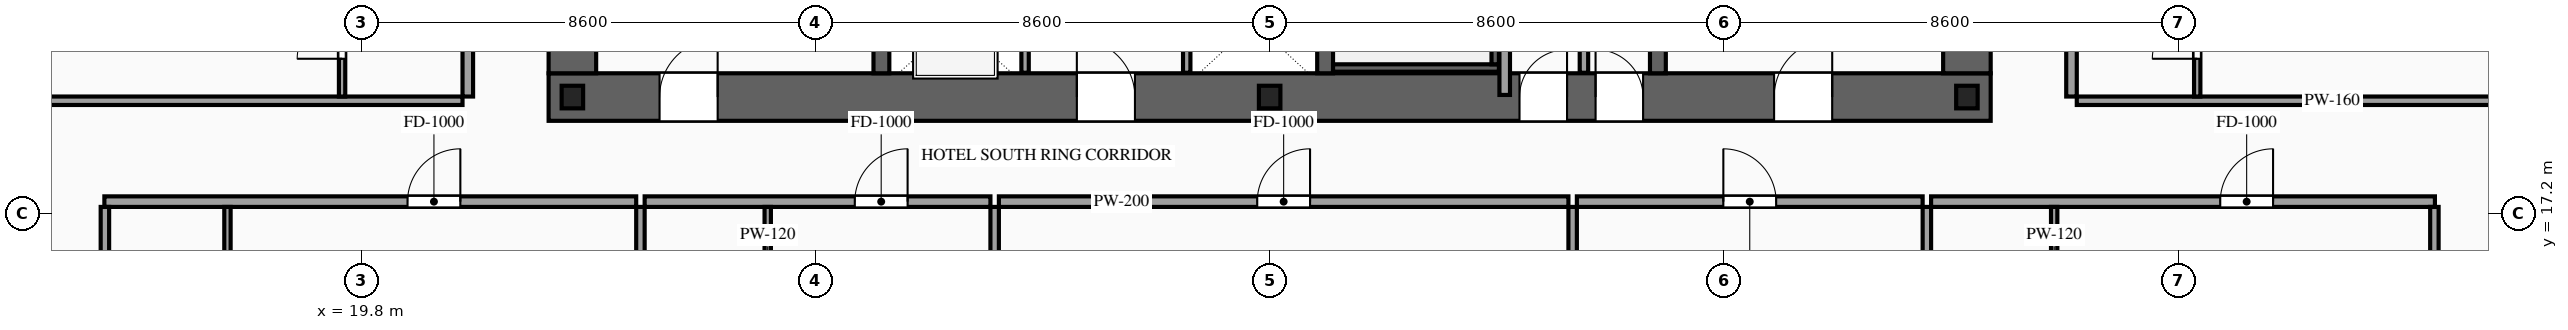
"""IFC4 building model, lengths in metres.
Left out: names, types, materials, properties, quantities, classifications, styles, units other than length and angle.
Written with IfcOpenShell. Run it as: python <this file> out.ifc"""

import sys

from ifc_helpers import new_model, si_unit, direction, frame, frame_2d, origin, origin_2d, place, context, subcontext, project, spatial, rectangle, i_section, extrude, source, transform, mapped, element, fill, save


model = new_model("IFC4")
c1 = context("Model", 3, precision=1e-05, world=origin(), true_north=direction((0.0, 1.0)))
c2 = subcontext(c1, "Body", "Model", "MODEL_VIEW")
j1 = project(units=[si_unit("LENGTHUNIT", "METRE"), si_unit("PLANEANGLEUNIT", "RADIAN")], contexts=[c1])
p1 = place(None, origin())
s1 = spatial("IfcSite", under=j1, at=p1, CompositionType="ELEMENT")
p2 = place(p1, origin())
s2 = spatial("IfcBuilding", under=s1, at=p2, CompositionType="ELEMENT")
p3 = place(p2, frame((0.0, 0.0, 46.0)))
s3 = spatial("IfcBuildingStorey", under=s2, at=p3, CompositionType="ELEMENT", Elevation=46.0)
p4 = place(p3, frame((23.35, 19.4, 0.0), z_axis=(0.0, 0.0, 1.0), x_axis=(1.0, 0.0, 0.0)))
e1 = element("IfcWall", 1, at=p4, inside=s3, PredefinedType="SHEAR", context=c2, shape_type="SweptSolid", body=[
    extrude(rectangle(XDim=27.3, YDim=0.9, at=frame_2d((13.65, 0.0))), origin(), (0.0, 0.0, 1.0), 3.6),
])
p5 = place(p4, frame((2.1, 0.0, 0.0)))
e2 = element("IfcOpeningElement", 2, at=p5, cuts=e1, PredefinedType="OPENING", context=c2, shape_type="SweptSolid", body=[
    extrude(rectangle(XDim=1.1, YDim=2.2, at=frame_2d((0.55, 1.1))), frame((0.0, 0.465, 0.0), z_axis=(0.0, -1.0, 0.0), x_axis=(1.0, 0.0, 0.0)), (0.0, 0.0, 1.0), 0.93),
])
p6 = place(p4, frame((10.0, 0.0, 0.0)))
e3 = element("IfcOpeningElement", 3, at=p6, cuts=e1, PredefinedType="OPENING", context=c2, shape_type="SweptSolid", body=[
    extrude(rectangle(XDim=1.1, YDim=2.2, at=frame_2d((0.55, 1.1))), frame((0.0, 0.465, 0.0), z_axis=(0.0, -1.0, 0.0), x_axis=(1.0, 0.0, 0.0)), (0.0, 0.0, 1.0), 0.93),
])
p7 = place(p4, frame((23.2, 0.0, 0.0)))
e4 = element("IfcOpeningElement", 4, at=p7, cuts=e1, PredefinedType="OPENING", context=c2, shape_type="SweptSolid", body=[
    extrude(rectangle(XDim=1.1, YDim=2.2, at=frame_2d((0.55, 1.1))), frame((0.0, 0.465, 0.0), z_axis=(0.0, -1.0, 0.0), x_axis=(1.0, 0.0, 0.0)), (0.0, 0.0, 1.0), 0.93),
])
p8 = place(p4, frame((19.82, 0.0, 0.0)))
e5 = element("IfcOpeningElement", 5, at=p8, cuts=e1, PredefinedType="OPENING", context=c2, shape_type="SweptSolid", body=[
    extrude(rectangle(XDim=0.9, YDim=2.15, at=frame_2d((0.45, 1.075))), frame((0.0, 0.465, 0.0), z_axis=(0.0, -1.0, 0.0), x_axis=(1.0, 0.0, 0.0)), (0.0, 0.0, 1.0), 0.93),
])
p9 = place(p4, frame((18.38, 0.0, 0.0)))
e6 = element("IfcOpeningElement", 6, at=p9, cuts=e1, PredefinedType="OPENING", context=c2, shape_type="SweptSolid", body=[
    extrude(rectangle(XDim=0.9, YDim=2.15, at=frame_2d((0.45, 1.075))), frame((0.0, 0.465, 0.0), z_axis=(0.0, -1.0, 0.0), x_axis=(1.0, 0.0, 0.0)), (0.0, 0.0, 1.0), 0.93),
])
m1 = source(origin(), c2, "Body", "SweptSolid", [
    extrude(rectangle(XDim=11.9, YDim=0.9, at=frame_2d((5.95, 0.0))), origin(), (0.0, 0.0, 1.0), 3.6),
])
for number, where, z_axis, x_axis in (
    (7, (23.8, 19.85, 0.0), (0.0, 0.0, 1.0), (0.0, 1.0, 0.0)),
    (8, (50.2, 19.85, 0.0), (0.0, 0.0, 1.0), (0.0, 1.0, 0.0)),
):
    element("IfcWall", number, at=place(p3, frame(where, z_axis=z_axis, x_axis=x_axis)), inside=s3, PredefinedType="SHEAR", context=c2, shape_type="MappedRepresentation", body=[
        mapped(m1, transform((0.0, 0.0, 0.0), scale=1.0)),
    ])
m2 = source(origin(), c2, "Body", "SweptSolid", [
    extrude(rectangle(XDim=11.9, YDim=0.3, at=frame_2d((5.95, 0.0))), origin(), (0.0, 0.0, 1.0), 3.6),
])
for number, where, z_axis, x_axis in (
    (9, (29.65, 19.85, 0.0), (0.0, 0.0, 1.0), (0.0, 1.0, 0.0)),
    (10, (38.05, 19.85, 0.0), (0.0, 0.0, 1.0), (0.0, 1.0, 0.0)),
    (11, (44.35, 19.85, 0.0), (0.0, 0.0, 1.0), (0.0, 1.0, 0.0)),
):
    element("IfcWall", number, at=place(p3, frame(where, z_axis=z_axis, x_axis=x_axis)), inside=s3, PredefinedType="SOLIDWALL", context=c2, shape_type="MappedRepresentation", body=[
        mapped(m2, transform((0.0, 0.0, 0.0), scale=1.0)),
    ])
m3 = source(origin(), c2, "Body", "SweptSolid", [
    extrude(i_section(OverallWidth=0.407, OverallDepth=0.428, WebThickness=0.02, FlangeThickness=0.035, at=origin_2d()), origin(), (0.0, 0.0, 1.0), 3.6),
])
for number, where, z_axis, x_axis in (
    (12, (23.8, 19.4, 0.0), (0.0, 0.0, 1.0), (1.0, 0.0, 0.0)),
    (13, (37.0, 19.4, 0.0), (0.0, 0.0, 1.0), (1.0, 0.0, 0.0)),
    (14, (50.2, 19.4, 0.0), (0.0, 0.0, 1.0), (1.0, 0.0, 0.0)),
):
    element("IfcColumn", number, at=place(p3, frame(where, z_axis=z_axis, x_axis=x_axis)), inside=s3, PredefinedType="COLUMN", context=c2, shape_type="MappedRepresentation", body=[
        mapped(m3, transform((0.0, 0.0, 0.0), scale=1.0)),
    ])
p10 = place(p3, frame((32.37, 19.86, 0.0), z_axis=(0.0, 0.0, 1.0), x_axis=(0.0, 1.0, 0.0)))
e15 = element("IfcWall", 15, at=p10, inside=s3, PredefinedType="SOLIDWALL", context=c2, shape_type="SweptSolid", body=[
    extrude(rectangle(XDim=2.04, YDim=0.14, at=frame_2d((1.02, 0.0))), origin(), (0.0, 0.0, 1.0), 3.38),
])
p11 = place(p10, frame((0.47, 0.0, 0.0)))
e16 = element("IfcOpeningElement", 16, at=p11, cuts=e15, PredefinedType="OPENING", context=c2, shape_type="SweptSolid", body=[
    extrude(rectangle(XDim=1.1, YDim=2.2, at=frame_2d((0.55, 1.1))), frame((0.0, 0.085, 0.0), z_axis=(0.0, -1.0, 0.0), x_axis=(1.0, 0.0, 0.0)), (0.0, 0.0, 1.0), 0.17),
])
m4 = source(origin(), c2, "Body", "SweptSolid", [
    extrude(rectangle(XDim=2.04, YDim=0.14, at=frame_2d((1.02, 0.0))), origin(), (0.0, 0.0, 1.0), 3.38),
])
p12 = place(p3, frame((35.43, 19.86, 0.0), z_axis=(0.0, 0.0, 1.0), x_axis=(0.0, 1.0, 0.0)))
e17 = element("IfcWall", 17, at=p12, inside=s3, PredefinedType="SOLIDWALL", context=c2, shape_type="MappedRepresentation", body=[
    mapped(m4, transform((0.0, 0.0, 0.0), scale=1.0)),
])
m5 = source(origin(), c2, "Body", "SweptSolid", [
    extrude(rectangle(XDim=3.14, YDim=0.14, at=frame_2d((1.57, 0.0))), origin(), (0.0, 0.0, 1.0), 3.38),
])
p13 = place(p3, frame((38.2, 19.95, 0.0), z_axis=(0.0, 0.0, 1.0), x_axis=(1.0, 0.0, 0.0)))
e18 = element("IfcWall", 18, at=p13, inside=s3, PredefinedType="SOLIDWALL", context=c2, shape_type="MappedRepresentation", body=[
    mapped(m5, transform((0.0, 0.0, 0.0), scale=1.0)),
])
m6 = source(origin(), c2, "Body", "SweptSolid", [
    extrude(rectangle(XDim=8.94, YDim=0.14, at=frame_2d((4.47, 0.0))), origin(), (0.0, 0.0, 1.0), 3.38),
])
p14 = place(p3, frame((41.27, 20.02, 0.0), z_axis=(0.0, 0.0, 1.0), x_axis=(0.0, 1.0, 0.0)))
e19 = element("IfcWall", 19, at=p14, inside=s3, PredefinedType="SOLIDWALL", context=c2, shape_type="MappedRepresentation", body=[
    mapped(m6, transform((0.0, 0.0, 0.0), scale=1.0)),
])
m7 = source(origin(), c2, "Body", "SweptSolid", [
    extrude(rectangle(XDim=1.34, YDim=0.16, at=frame_2d((0.67, 0.0))), origin(), (0.0, 0.0, 1.0), 3.38),
])
p15 = place(p3, frame((42.95, 19.86, 0.0), z_axis=(0.0, 0.0, 1.0), x_axis=(0.0, 1.0, 0.0)))
e20 = element("IfcWall", 20, at=p15, inside=s3, PredefinedType="PARTITIONING", context=c2, shape_type="MappedRepresentation", body=[
    mapped(m7, transform((0.0, 0.0, 0.0), scale=1.0)),
])
m8 = source(origin(), c2, "Body", "SweptSolid", [
    extrude(rectangle(XDim=6.51, YDim=0.2, at=frame_2d((3.255, 0.0))), origin(), (0.0, 0.0, 1.0), 3.38),
])
p16 = place(p3, frame((41.45, 19.44, 0.0), z_axis=(0.0, 0.0, 1.0), x_axis=(0.0, 1.0, 0.0)))
e21 = element("IfcWall", 21, at=p16, inside=s3, PredefinedType="PARTITIONING", context=c2, shape_type="MappedRepresentation", body=[
    mapped(m8, transform((0.0, 0.0, 0.0), scale=1.0)),
])
p17 = place(p3, frame((14.94, 17.42, 0.0), z_axis=(0.0, 0.0, 1.0), x_axis=(1.0, 0.0, 0.0)))
e22 = element("IfcWall", 22, at=p17, inside=s3, PredefinedType="PARTITIONING", context=c2, shape_type="SweptSolid", body=[
    extrude(rectangle(XDim=10.068, YDim=0.2, at=frame_2d((5.034, 0.0))), origin(), (0.0, 0.0, 1.0), 3.38),
])
p18 = place(p17, frame((5.739, 0.0, 0.0)))
e23 = element("IfcOpeningElement", 23, at=p18, cuts=e22, PredefinedType="OPENING", context=c2, shape_type="SweptSolid", body=[
    extrude(rectangle(XDim=1.0, YDim=2.2, at=frame_2d((0.5, 1.1))), frame((0.0, 0.115, 0.0), z_axis=(0.0, -1.0, 0.0), x_axis=(1.0, 0.0, 0.0)), (0.0, 0.0, 1.0), 0.23),
])
m9 = source(origin(), c2, "Body", "SweptSolid", [
    extrude(rectangle(XDim=16.47, YDim=0.16, at=frame_2d((8.235, 0.0))), origin(), (0.0, 0.0, 1.0), 3.38),
])
p19 = place(p3, frame((25.088, 0.85, 0.0), z_axis=(0.0, 0.0, 1.0), x_axis=(0.0, 1.0, 0.0)))
e24 = element("IfcWall", 24, at=p19, inside=s3, PredefinedType="PARTITIONING", context=c2, shape_type="MappedRepresentation", body=[
    mapped(m9, transform((0.0, 0.0, 0.0), scale=1.0)),
])
m10 = source(origin(), c2, "Body", "SweptSolid", [
    extrude(rectangle(XDim=2.42, YDim=0.12, at=frame_2d((1.21, 0.0))), origin(), (0.0, 0.0, 1.0), 3.38),
])
p20 = place(p3, frame((17.27, 14.9, 0.0), z_axis=(0.0, 0.0, 1.0), x_axis=(0.0, 1.0, 0.0)))
e25 = element("IfcWall", 25, at=p20, inside=s3, PredefinedType="PARTITIONING", context=c2, shape_type="MappedRepresentation", body=[
    mapped(m10, transform((0.0, 0.0, 0.0), scale=1.0)),
])
p21 = place(p3, frame((25.168, 17.42, 0.0), z_axis=(0.0, 0.0, 1.0), x_axis=(1.0, 0.0, 0.0)))
e26 = element("IfcWall", 26, at=p21, inside=s3, PredefinedType="PARTITIONING", context=c2, shape_type="SweptSolid", body=[
    extrude(rectangle(XDim=6.546, YDim=0.2, at=frame_2d((3.273, 0.0))), origin(), (0.0, 0.0, 1.0), 3.38),
])
p22 = place(p21, frame((3.978, 0.0, 0.0)))
e27 = element("IfcOpeningElement", 27, at=p22, cuts=e26, PredefinedType="OPENING", context=c2, shape_type="SweptSolid", body=[
    extrude(rectangle(XDim=1.0, YDim=2.2, at=frame_2d((0.5, 1.1))), frame((0.0, 0.115, 0.0), z_axis=(0.0, -1.0, 0.0), x_axis=(1.0, 0.0, 0.0)), (0.0, 0.0, 1.0), 0.23),
])
p23 = place(p3, frame((31.794, 0.85, 0.0), z_axis=(0.0, 0.0, 1.0), x_axis=(0.0, 1.0, 0.0)))
e28 = element("IfcWall", 28, at=p23, inside=s3, PredefinedType="PARTITIONING", context=c2, shape_type="MappedRepresentation", body=[
    mapped(m9, transform((0.0, 0.0, 0.0), scale=1.0)),
])
p24 = place(p3, frame((27.498, 14.9, 0.0), z_axis=(0.0, 0.0, 1.0), x_axis=(0.0, 1.0, 0.0)))
e29 = element("IfcWall", 29, at=p24, inside=s3, PredefinedType="PARTITIONING", context=c2, shape_type="MappedRepresentation", body=[
    mapped(m10, transform((0.0, 0.0, 0.0), scale=1.0)),
])
p25 = place(p3, frame((31.874, 17.42, 0.0), z_axis=(0.0, 0.0, 1.0), x_axis=(1.0, 0.0, 0.0)))
e30 = element("IfcWall", 30, at=p25, inside=s3, PredefinedType="PARTITIONING", context=c2, shape_type="SweptSolid", body=[
    extrude(rectangle(XDim=10.782, YDim=0.2, at=frame_2d((5.391, 0.0))), origin(), (0.0, 0.0, 1.0), 3.38),
])
p26 = place(p25, frame((4.891, 0.0, 0.0)))
e31 = element("IfcOpeningElement", 31, at=p26, cuts=e30, PredefinedType="OPENING", context=c2, shape_type="SweptSolid", body=[
    extrude(rectangle(XDim=1.0, YDim=2.2, at=frame_2d((0.5, 1.1))), frame((0.0, 0.115, 0.0), z_axis=(0.0, -1.0, 0.0), x_axis=(1.0, 0.0, 0.0)), (0.0, 0.0, 1.0), 0.23),
])
p27 = place(p3, frame((42.736, 0.85, 0.0), z_axis=(0.0, 0.0, 1.0), x_axis=(0.0, 1.0, 0.0)))
e32 = element("IfcWall", 32, at=p27, inside=s3, PredefinedType="PARTITIONING", context=c2, shape_type="MappedRepresentation", body=[
    mapped(m9, transform((0.0, 0.0, 0.0), scale=1.0)),
])
p28 = place(p3, frame((42.816, 17.42, 0.0), z_axis=(0.0, 0.0, 1.0), x_axis=(1.0, 0.0, 0.0)))
e33 = element("IfcWall", 33, at=p28, inside=s3, PredefinedType="PARTITIONING", context=c2, shape_type="SweptSolid", body=[
    extrude(rectangle(XDim=6.546, YDim=0.2, at=frame_2d((3.273, 0.0))), origin(), (0.0, 0.0, 1.0), 3.38),
])
p29 = place(p28, frame((2.773, 0.0, 0.0)))
e34 = element("IfcOpeningElement", 34, at=p29, cuts=e33, PredefinedType="OPENING", context=c2, shape_type="SweptSolid", body=[
    extrude(rectangle(XDim=1.0, YDim=2.2, at=frame_2d((0.5, 1.1))), frame((0.0, 0.115, 0.0), z_axis=(0.0, -1.0, 0.0), x_axis=(1.0, 0.0, 0.0)), (0.0, 0.0, 1.0), 0.23),
])
p30 = place(p3, frame((49.442, 0.85, 0.0), z_axis=(0.0, 0.0, 1.0), x_axis=(0.0, 1.0, 0.0)))
e35 = element("IfcWall", 35, at=p30, inside=s3, PredefinedType="PARTITIONING", context=c2, shape_type="MappedRepresentation", body=[
    mapped(m9, transform((0.0, 0.0, 0.0), scale=1.0)),
])
p31 = place(p3, frame((49.522, 17.42, 0.0), z_axis=(0.0, 0.0, 1.0), x_axis=(1.0, 0.0, 0.0)))
e36 = element("IfcWall", 36, at=p31, inside=s3, PredefinedType="PARTITIONING", context=c2, shape_type="SweptSolid", body=[
    extrude(rectangle(XDim=9.538, YDim=0.2, at=frame_2d((4.769, 0.0))), origin(), (0.0, 0.0, 1.0), 3.38),
])
p32 = place(p31, frame((5.474, 0.0, 0.0)))
e37 = element("IfcOpeningElement", 37, at=p32, cuts=e36, PredefinedType="OPENING", context=c2, shape_type="SweptSolid", body=[
    extrude(rectangle(XDim=1.0, YDim=2.2, at=frame_2d((0.5, 1.1))), frame((0.0, 0.115, 0.0), z_axis=(0.0, -1.0, 0.0), x_axis=(1.0, 0.0, 0.0)), (0.0, 0.0, 1.0), 0.23),
])
m11 = source(origin(), c2, "Body", "SweptSolid", [
    extrude(rectangle(XDim=16.32, YDim=0.16, at=frame_2d((8.16, 0.0))), origin(), (0.0, 0.0, 1.0), 3.38),
])
for number, where, z_axis, x_axis in (
    (38, (14.95, 1.0, 0.0), (0.0, 0.0, 1.0), (0.0, 1.0, 0.0)),
    (39, (59.05, 1.0, 0.0), (0.0, 0.0, 1.0), (0.0, 1.0, 0.0)),
):
    element("IfcWall", number, at=place(p3, frame(where, z_axis=z_axis, x_axis=x_axis)), inside=s3, PredefinedType="PARTITIONING", context=c2, shape_type="MappedRepresentation", body=[
        mapped(m11, transform((0.0, 0.0, 0.0), scale=1.0)),
    ])
p33 = place(p3, frame((51.852, 14.9, 0.0), z_axis=(0.0, 0.0, 1.0), x_axis=(0.0, 1.0, 0.0)))
e40 = element("IfcWall", 40, at=p33, inside=s3, PredefinedType="PARTITIONING", context=c2, shape_type="MappedRepresentation", body=[
    mapped(m10, transform((0.0, 0.0, 0.0), scale=1.0)),
])
p34 = place(p3, frame((21.82, 19.41, 0.0), z_axis=(0.0, 0.0, 1.0), x_axis=(0.0, 1.0, 0.0)))
e41 = element("IfcWall", 41, at=p34, inside=s3, PredefinedType="PARTITIONING", context=c2, shape_type="SweptSolid", body=[
    extrude(rectangle(XDim=6.31, YDim=0.2, at=frame_2d((3.155, 0.0))), origin(), (0.0, 0.0, 1.0), 3.38),
])
p35 = place(p34, frame((3.835, 0.0, 0.0)))
e42 = element("IfcOpeningElement", 42, at=p35, cuts=e41, PredefinedType="OPENING", context=c2, shape_type="SweptSolid", body=[
    extrude(rectangle(XDim=1.0, YDim=2.2, at=frame_2d((0.5, 1.1))), frame((0.0, 0.115, 0.0), z_axis=(0.0, -1.0, 0.0), x_axis=(1.0, 0.0, 0.0)), (0.0, 0.0, 1.0), 0.23),
])
m12 = source(origin(), c2, "Body", "SweptSolid", [
    extrude(rectangle(XDim=9.67, YDim=0.16, at=frame_2d((4.835, 0.0))), origin(), (0.0, 0.0, 1.0), 2.875),
])
p36 = place(p3, frame((12.05, 19.33, 0.0), z_axis=(0.0, 0.0, 1.0), x_axis=(1.0, 0.0, 0.0)))
e43 = element("IfcWall", 43, at=p36, inside=s3, PredefinedType="PARTITIONING", context=c2, shape_type="MappedRepresentation", body=[
    mapped(m12, transform((0.0, 0.0, 0.0), scale=1.0)),
])
p37 = place(p3, frame((19.44, 19.41, 0.0), z_axis=(0.0, 0.0, 1.0), x_axis=(0.0, 1.0, 0.0)))
e44 = element("IfcWall", 44, at=p37, inside=s3, PredefinedType="PARTITIONING", context=c2, shape_type="SweptSolid", body=[
    extrude(rectangle(XDim=2.28, YDim=0.12, at=frame_2d((1.14, 0.0))), origin(), (0.0, 0.0, 1.0), 3.38),
])
p38 = place(p37, frame((0.715, 0.0, 0.0)))
e45 = element("IfcOpeningElement", 45, at=p38, cuts=e44, PredefinedType="OPENING", context=c2, shape_type="SweptSolid", body=[
    extrude(rectangle(XDim=0.85, YDim=2.1, at=frame_2d((0.425, 1.05))), frame((0.0, 0.075, 0.0), z_axis=(0.0, -1.0, 0.0), x_axis=(1.0, 0.0, 0.0)), (0.0, 0.0, 1.0), 0.15),
])
p39 = place(p3, frame((52.18, 19.41, 0.0), z_axis=(0.0, 0.0, 1.0), x_axis=(0.0, 1.0, 0.0)))
e46 = element("IfcWall", 46, at=p39, inside=s3, PredefinedType="PARTITIONING", context=c2, shape_type="SweptSolid", body=[
    extrude(rectangle(XDim=6.31, YDim=0.2, at=frame_2d((3.155, 0.0))), origin(), (0.0, 0.0, 1.0), 3.38),
])
p40 = place(p39, frame((3.835, 0.0, 0.0)))
e47 = element("IfcOpeningElement", 47, at=p40, cuts=e46, PredefinedType="OPENING", context=c2, shape_type="SweptSolid", body=[
    extrude(rectangle(XDim=1.0, YDim=2.2, at=frame_2d((0.5, 1.1))), frame((0.0, 0.115, 0.0), z_axis=(0.0, -1.0, 0.0), x_axis=(1.0, 0.0, 0.0)), (0.0, 0.0, 1.0), 0.23),
])
p41 = place(p3, frame((52.28, 19.33, 0.0), z_axis=(0.0, 0.0, 1.0), x_axis=(1.0, 0.0, 0.0)))
e48 = element("IfcWall", 48, at=p41, inside=s3, PredefinedType="PARTITIONING", context=c2, shape_type="MappedRepresentation", body=[
    mapped(m12, transform((0.0, 0.0, 0.0), scale=1.0)),
])
p42 = place(p3, frame((54.56, 19.41, 0.0), z_axis=(0.0, 0.0, 1.0), x_axis=(0.0, 1.0, 0.0)))
e49 = element("IfcWall", 49, at=p42, inside=s3, PredefinedType="PARTITIONING", context=c2, shape_type="SweptSolid", body=[
    extrude(rectangle(XDim=2.28, YDim=0.12, at=frame_2d((1.14, 0.0))), origin(), (0.0, 0.0, 1.0), 3.38),
])
p43 = place(p42, frame((0.715, 0.0, 0.0)))
e50 = element("IfcOpeningElement", 50, at=p43, cuts=e49, PredefinedType="OPENING", context=c2, shape_type="SweptSolid", body=[
    extrude(rectangle(XDim=0.85, YDim=2.1, at=frame_2d((0.425, 1.05))), frame((0.0, 0.075, 0.0), z_axis=(0.0, -1.0, 0.0), x_axis=(1.0, 0.0, 0.0)), (0.0, 0.0, 1.0), 0.15),
])
m13 = source(origin(), c2, "Body", "SweptSolid", [
    extrude(rectangle(XDim=1.1, YDim=2.2, at=frame_2d((0.55, 1.1))), frame((0.0, 0.025, 0.0), z_axis=(0.0, -1.0, 0.0), x_axis=(1.0, 0.0, 0.0)), (0.0, 0.0, 1.0), 0.05),
])
p44 = place(p5, origin())
e51 = element("IfcDoor", 51, at=p44, inside=s3, OperationType="SINGLE_SWING_RIGHT", PredefinedType="DOOR", context=c2, shape_type="MappedRepresentation", body=[
    mapped(m13, transform((0.0, 0.0, 0.0), scale=1.0)),
])
fill(e2, e51)
p45 = place(p6, origin())
e52 = element("IfcDoor", 52, at=p45, inside=s3, OperationType="SINGLE_SWING_LEFT", PredefinedType="DOOR", context=c2, shape_type="MappedRepresentation", body=[
    mapped(m13, transform((0.0, 0.0, 0.0), scale=1.0)),
])
fill(e3, e52)
p46 = place(p7, origin())
e53 = element("IfcDoor", 53, at=p46, inside=s3, OperationType="SINGLE_SWING_RIGHT", PredefinedType="DOOR", context=c2, shape_type="MappedRepresentation", body=[
    mapped(m13, transform((0.0, 0.0, 0.0), scale=1.0)),
])
fill(e4, e53)
m14 = source(origin(), c2, "Body", "SweptSolid", [
    extrude(rectangle(XDim=0.9, YDim=2.15, at=frame_2d((0.45, 1.075))), frame((0.0, 0.025, 0.0), z_axis=(0.0, -1.0, 0.0), x_axis=(1.0, 0.0, 0.0)), (0.0, 0.0, 1.0), 0.05),
])
p47 = place(p8, origin())
e54 = element("IfcDoor", 54, at=p47, inside=s3, OperationType="SINGLE_SWING_LEFT", PredefinedType="DOOR", context=c2, shape_type="MappedRepresentation", body=[
    mapped(m14, transform((0.0, 0.0, 0.0), scale=1.0)),
])
fill(e5, e54)
p48 = place(p9, origin())
e55 = element("IfcDoor", 55, at=p48, inside=s3, OperationType="SINGLE_SWING_RIGHT", PredefinedType="DOOR", context=c2, shape_type="MappedRepresentation", body=[
    mapped(m14, transform((0.0, 0.0, 0.0), scale=1.0)),
])
fill(e6, e55)
m15 = source(origin(), c2, "Body", "SweptSolid", [
    extrude(rectangle(XDim=1.0, YDim=2.2, at=frame_2d((0.5, 1.1))), frame((0.0, 0.025, 0.0), z_axis=(0.0, -1.0, 0.0), x_axis=(1.0, 0.0, 0.0)), (0.0, 0.0, 1.0), 0.05),
])
p49 = place(p18, origin())
e56 = element("IfcDoor", 56, at=p49, inside=s3, OperationType="SINGLE_SWING_RIGHT", PredefinedType="DOOR", context=c2, shape_type="MappedRepresentation", body=[
    mapped(m15, transform((0.0, 0.0, 0.0), scale=1.0)),
])
fill(e23, e56)
p50 = place(p22, origin())
e57 = element("IfcDoor", 57, at=p50, inside=s3, OperationType="SINGLE_SWING_RIGHT", PredefinedType="DOOR", context=c2, shape_type="MappedRepresentation", body=[
    mapped(m15, transform((0.0, 0.0, 0.0), scale=1.0)),
])
fill(e27, e57)
p51 = place(p26, origin())
e58 = element("IfcDoor", 58, at=p51, inside=s3, OperationType="SINGLE_SWING_RIGHT", PredefinedType="DOOR", context=c2, shape_type="MappedRepresentation", body=[
    mapped(m15, transform((0.0, 0.0, 0.0), scale=1.0)),
])
fill(e31, e58)
p52 = place(p29, origin())
e59 = element("IfcDoor", 59, at=p52, inside=s3, OperationType="SINGLE_SWING_LEFT", PredefinedType="DOOR", context=c2, shape_type="MappedRepresentation", body=[
    mapped(m15, transform((0.0, 0.0, 0.0), scale=1.0)),
])
fill(e34, e59)
p53 = place(p32, origin())
e60 = element("IfcDoor", 60, at=p53, inside=s3, OperationType="SINGLE_SWING_RIGHT", PredefinedType="DOOR", context=c2, shape_type="MappedRepresentation", body=[
    mapped(m15, transform((0.0, 0.0, 0.0), scale=1.0)),
])
fill(e37, e60)
m16 = source(origin(), c2, "Body", "SweptSolid", [
    extrude(rectangle(XDim=0.85, YDim=2.1, at=frame_2d((0.425, 1.05))), frame((0.0, 0.025, 0.0), z_axis=(0.0, -1.0, 0.0), x_axis=(1.0, 0.0, 0.0)), (0.0, 0.0, 1.0), 0.05),
])
p54 = place(p38, origin())
e61 = element("IfcDoor", 61, at=p54, inside=s3, OperationType="SINGLE_SWING_LEFT", PredefinedType="DOOR", context=c2, shape_type="MappedRepresentation", body=[
    mapped(m16, transform((0.0, 0.0, 0.0), scale=1.0)),
])
fill(e45, e61)
p55 = place(p43, origin())
e62 = element("IfcDoor", 62, at=p55, inside=s3, OperationType="SINGLE_SWING_LEFT", PredefinedType="DOOR", context=c2, shape_type="MappedRepresentation", body=[
    mapped(m16, transform((0.0, 0.0, 0.0), scale=1.0)),
])
fill(e50, e62)
save(model, sys.argv[1])
